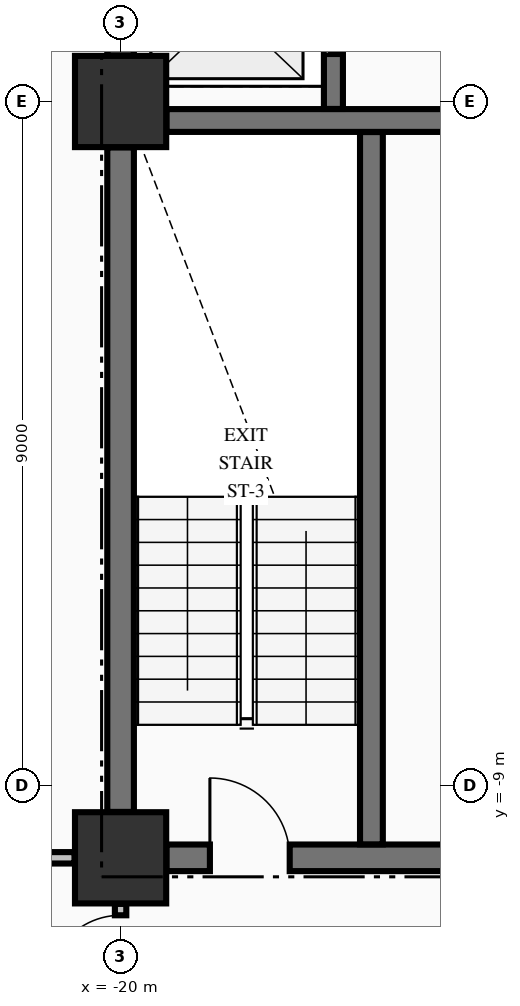
"""IFC4 building model, lengths in metres.
Left out: names, types, materials, properties, quantities, classifications, styles, units other than length and angle.
Written with IfcOpenShell. Run it as: python <this file> out.ifc"""

import sys

from ifc_helpers import new_model, si_unit, direction, frame, frame_2d, origin, origin_2d, place, context, subcontext, project, spatial, rectangle, extrude, element, fill, save


model = new_model("IFC4")
c1 = context("Model", 3, precision=1e-05, world=origin(), true_north=direction((0.0, 1.0)))
c2 = subcontext(c1, "Body", "Model", "MODEL_VIEW")
j1 = project(units=[si_unit("LENGTHUNIT", "METRE"), si_unit("PLANEANGLEUNIT", "RADIAN")], contexts=[c1])
p1 = place(None, origin())
s1 = spatial("IfcSite", under=j1, at=p1, CompositionType="ELEMENT")
p2 = place(p1, origin())
s2 = spatial("IfcBuilding", under=s1, at=p2, CompositionType="ELEMENT")
p3 = place(p2, frame((0.0, 0.0, 67.9)))
s3 = spatial("IfcBuildingStorey", under=s2, at=p3, CompositionType="ELEMENT", Elevation=67.9)
for number, where, z_axis, x_axis in (
    (1, (-20.0, -9.95, -0.25), (0.0, 0.0, 1.0), (1.0, 0.0, 0.0)),
    (2, (-20.0, 0.0, -0.25), (0.0, 0.0, 1.0), (1.0, 0.0, 0.0)),
):
    element("IfcColumn", number, at=place(p3, frame(where, z_axis=z_axis, x_axis=x_axis)), inside=s3, PredefinedType="COLUMN", context=c2, shape_type="SweptSolid", body=[
        extrude(rectangle(XDim=1.2, YDim=1.2, at=origin_2d()), origin(), (0.0, 0.0, 1.0), 3.495),
    ])
p4 = place(p3, frame((-19.396, -9.95, 0.0), z_axis=(0.0, 0.0, 1.0), x_axis=(1.0, 0.0, 0.0)))
e3 = element("IfcWall", 3, at=p4, inside=s3, PredefinedType="SHEAR", context=c2, shape_type="SweptSolid", body=[
    extrude(rectangle(XDim=4.696, YDim=0.35, at=frame_2d((2.348, 0.0))), origin(), (0.0, 0.0, 1.0), 3.245),
])
p5 = place(p4, frame((0.571, 0.0, 0.0)))
e4 = element("IfcOpeningElement", 4, at=p5, cuts=e3, PredefinedType="OPENING", context=c2, shape_type="SweptSolid", body=[
    extrude(rectangle(XDim=1.05, YDim=2.15, at=frame_2d((0.525, 1.075))), frame((0.0, 0.185, 0.0), z_axis=(0.0, -1.0, 0.0), x_axis=(1.0, 0.0, 0.0)), (0.0, 0.0, 1.0), 0.37),
])
p6 = place(p3, frame((-19.396, -0.25, 0.0), z_axis=(0.0, 0.0, 1.0), x_axis=(1.0, 0.0, 0.0)))
e5 = element("IfcWall", 5, at=p6, inside=s3, PredefinedType="SHEAR", context=c2, shape_type="SweptSolid", body=[
    extrude(rectangle(XDim=7.792, YDim=0.3, at=frame_2d((3.896, 0.0))), origin(), (0.0, 0.0, 1.0), 3.245),
])
p7 = place(p6, frame((5.696, 0.0, 0.0)))
e6 = element("IfcOpeningElement", 6, at=p7, cuts=e5, PredefinedType="OPENING", context=c2, shape_type="SweptSolid", body=[
    extrude(rectangle(XDim=1.1, YDim=2.15, at=frame_2d((0.55, 1.075))), frame((0.0, 0.16, 0.0), z_axis=(0.0, -1.0, 0.0), x_axis=(1.0, 0.0, 0.0)), (0.0, 0.0, 1.0), 0.32),
])
p8 = place(p3, frame((-28.835, -9.95, 0.0), z_axis=(0.0, 0.0, 1.0), x_axis=(1.0, 0.0, 0.0)))
e7 = element("IfcWall", 7, at=p8, inside=s3, PredefinedType="PARTITIONING", context=c2, shape_type="SweptSolid", body=[
    extrude(rectangle(XDim=8.229, YDim=0.15, at=frame_2d((4.115, 0.0))), origin(), (0.0, 0.0, 1.0), 3.245),
])
p9 = place(p8, frame((3.835, 0.0, 0.0)))
e8 = element("IfcOpeningElement", 8, at=p9, cuts=e7, PredefinedType="OPENING", context=c2, shape_type="SweptSolid", body=[
    extrude(rectangle(XDim=1.0, YDim=2.15, at=frame_2d((0.5, 1.075))), frame((0.0, 0.085, 0.0), z_axis=(0.0, -1.0, 0.0), x_axis=(1.0, 0.0, 0.0)), (0.0, 0.0, 1.0), 0.17),
])
p10 = place(p3, frame((-20.0, -9.346, 0.0), z_axis=(0.0, 0.0, 1.0), x_axis=(0.0, 1.0, 0.0)))
e9 = element("IfcWall", 9, at=p10, inside=s3, PredefinedType="SHEAR", context=c2, shape_type="SweptSolid", body=[
    extrude(rectangle(XDim=8.742, YDim=0.35, at=frame_2d((4.371, 0.0))), origin(), (0.0, 0.0, 1.0), 3.245),
])
p11 = place(p3, frame((-20.0, 0.604, 0.0), z_axis=(0.0, 0.0, 1.0), x_axis=(0.0, 1.0, 0.0)))
e10 = element("IfcWall", 10, at=p11, inside=s3, PredefinedType="SHEAR", context=c2, shape_type="SweptSolid", body=[
    extrude(rectangle(XDim=1.869, YDim=0.35, at=frame_2d((0.935, 0.0))), origin(), (0.0, 0.0, 1.0), 3.245),
])
p12 = place(p3, frame((-17.2, -0.098, 0.0), z_axis=(0.0, 0.0, 1.0), x_axis=(0.0, 1.0, 0.0)))
e11 = element("IfcWall", 11, at=p12, inside=s3, PredefinedType="SOLIDWALL", context=c2, shape_type="SweptSolid", body=[
    extrude(rectangle(XDim=2.571, YDim=0.25, at=frame_2d((1.285, 0.0))), origin(), (0.0, 0.0, 1.0), 3.245),
])
p13 = place(p12, frame((0.723, 0.0, 0.0)))
e12 = element("IfcOpeningElement", 12, at=p13, cuts=e11, PredefinedType="OPENING", context=c2, shape_type="SweptSolid", body=[
    extrude(rectangle(XDim=1.1, YDim=2.2, at=frame_2d((0.55, 1.1))), frame((0.0, 0.135, 0.0), z_axis=(0.0, -1.0, 0.0), x_axis=(1.0, 0.0, 0.0)), (0.0, 0.0, 1.0), 0.27),
])
p14 = place(p3, frame((-16.7, -9.773, 0.0), z_axis=(0.0, 0.0, 1.0), x_axis=(0.0, 1.0, 0.0)))
e13 = element("IfcWall", 13, at=p14, inside=s3, PredefinedType="SHEAR", context=c2, shape_type="SweptSolid", body=[
    extrude(rectangle(XDim=9.371, YDim=0.3, at=frame_2d((4.686, 0.0))), origin(), (0.0, 0.0, 1.0), 3.245),
])
p15 = place(p3, frame((-20.0, -12.122, 0.0), z_axis=(0.0, 0.0, 1.0), x_axis=(0.0, 1.0, 0.0)))
e14 = element("IfcWall", 14, at=p15, inside=s3, PredefinedType="PARTITIONING", context=c2, shape_type="SweptSolid", body=[
    extrude(rectangle(XDim=1.566, YDim=0.15, at=frame_2d((0.783, 0.0))), origin(), (0.0, 0.0, 1.0), 2.585),
])
p16 = place(p15, frame((0.466, 0.0, 0.0)))
e15 = element("IfcOpeningElement", 15, at=p16, cuts=e14, PredefinedType="OPENING", context=c2, shape_type="SweptSolid", body=[
    extrude(rectangle(XDim=0.95, YDim=2.15, at=frame_2d((0.475, 1.075))), frame((0.0, 0.085, 0.0), z_axis=(0.0, -1.0, 0.0), x_axis=(1.0, 0.0, 0.0)), (0.0, 0.0, 1.0), 0.17),
])
p17 = place(p5, origin())
e16 = element("IfcDoor", 16, at=p17, inside=s3, OperationType="SINGLE_SWING_LEFT", PredefinedType="DOOR", context=c2, shape_type="SweptSolid", body=[
    extrude(rectangle(XDim=1.05, YDim=2.15, at=frame_2d((0.525, 1.075))), frame((0.0, 0.025, 0.0), z_axis=(0.0, -1.0, 0.0), x_axis=(1.0, 0.0, 0.0)), (0.0, 0.0, 1.0), 0.05),
])
fill(e4, e16)
p18 = place(p13, origin())
e17 = element("IfcDoor", 17, at=p18, inside=s3, OperationType="SLIDING_TO_LEFT", PredefinedType="DOOR", context=c2, shape_type="SweptSolid", body=[
    extrude(rectangle(XDim=1.1, YDim=2.2, at=frame_2d((0.55, 1.1))), frame((0.0, 0.025, 0.0), z_axis=(0.0, -1.0, 0.0), x_axis=(1.0, 0.0, 0.0)), (0.0, 0.0, 1.0), 0.05),
])
fill(e12, e17)
p19 = place(p16, origin())
e18 = element("IfcDoor", 18, at=p19, inside=s3, OperationType="SINGLE_SWING_LEFT", PredefinedType="DOOR", context=c2, shape_type="SweptSolid", body=[
    extrude(rectangle(XDim=0.95, YDim=2.15, at=frame_2d((0.475, 1.075))), frame((0.0, 0.025, 0.0), z_axis=(0.0, -1.0, 0.0), x_axis=(1.0, 0.0, 0.0)), (0.0, 0.0, 1.0), 0.05),
])
fill(e15, e18)
save(model, sys.argv[1])
